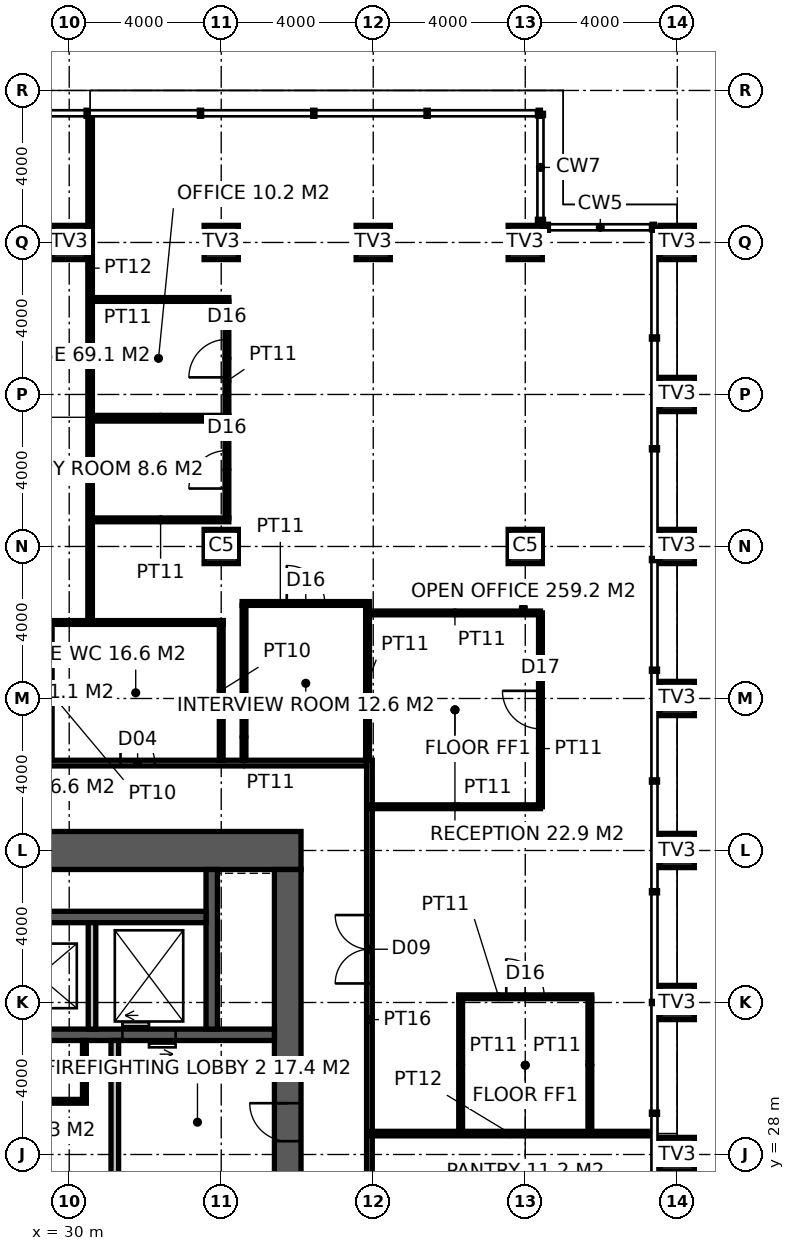
"""IFC4 building model, lengths in metres.
Left out: names, types, materials, properties, quantities, classifications, styles, units other than length and angle.
Written with IfcOpenShell. Run it as: python <this file> out.ifc"""

import sys

from ifc_helpers import new_model, si_unit, direction, frame, frame_2d, origin, origin_2d, place, context, subcontext, project, spatial, rectangle, hollow_rectangle, extrude, element, fill, save


model = new_model("IFC4")
c1 = context("Model", 3, precision=1e-05, world=origin(), true_north=direction((0.0, 1.0)))
c2 = subcontext(c1, "Body", "Model", "MODEL_VIEW")
j1 = project(units=[si_unit("LENGTHUNIT", "METRE"), si_unit("PLANEANGLEUNIT", "RADIAN")], contexts=[c1])
p1 = place(None, origin())
s1 = spatial("IfcSite", under=j1, at=p1, CompositionType="ELEMENT")
p2 = place(p1, origin())
s2 = spatial("IfcBuilding", under=s1, at=p2, CompositionType="ELEMENT")
p3 = place(p2, frame((0.0, 0.0, 171.8)))
s3 = spatial("IfcBuildingStorey", under=s2, at=p3, CompositionType="ELEMENT", Elevation=171.8)
for number, where, z_axis, x_axis in (
    (1, (46.0, 28.0, 0.0), (0.0, 0.0, 1.0), (1.0, 0.0, 0.0)),
    (2, (46.0, 32.0, 0.0), (0.0, 0.0, 1.0), (1.0, 0.0, 0.0)),
    (3, (46.0, 36.0, 0.0), (0.0, 0.0, 1.0), (1.0, 0.0, 0.0)),
    (4, (46.0, 40.0, 0.0), (0.0, 0.0, 1.0), (1.0, 0.0, 0.0)),
    (5, (46.0, 44.0, 0.0), (0.0, 0.0, 1.0), (1.0, 0.0, 0.0)),
    (6, (46.0, 48.0, 0.0), (0.0, 0.0, 1.0), (1.0, 0.0, 0.0)),
    (7, (46.0, 52.0, 0.0), (0.0, 0.0, 1.0), (1.0, 0.0, 0.0)),
    (8, (30.0, 52.0, 0.0), (0.0, 0.0, 1.0), (1.0, 0.0, 0.0)),
    (9, (34.0, 52.0, 0.0), (0.0, 0.0, 1.0), (1.0, 0.0, 0.0)),
    (10, (38.0, 52.0, 0.0), (0.0, 0.0, 1.0), (1.0, 0.0, 0.0)),
    (11, (42.0, 52.0, 0.0), (0.0, 0.0, 1.0), (1.0, 0.0, 0.0)),
):
    element("IfcColumn", number, at=place(p3, frame(where, z_axis=z_axis, x_axis=x_axis)), inside=s3, PredefinedType="USERDEFINED", context=c2, shape_type="SweptSolid", body=[
        extrude(hollow_rectangle(XDim=0.9, YDim=0.9, WallThickness=0.08, at=origin_2d()), origin(), (0.0, 0.0, 1.0), 4.0),
    ])
for number, where, z_axis, x_axis in (
    (12, (34.0, 44.0, 0.0), (0.0, 0.0, 1.0), (1.0, 0.0, 0.0)),
    (13, (42.0, 44.0, 0.0), (0.0, 0.0, 1.0), (1.0, 0.0, 0.0)),
):
    element("IfcColumn", number, at=place(p3, frame(where, z_axis=z_axis, x_axis=x_axis)), inside=s3, PredefinedType="COLUMN", context=c2, shape_type="SweptSolid", body=[
        extrude(hollow_rectangle(XDim=0.9, YDim=0.9, WallThickness=0.1, at=origin_2d()), origin(), (0.0, 0.0, 1.0), 4.0),
    ])
p4 = place(p3, frame((18.5, 36.0, -0.15), z_axis=(0.0, 0.0, 1.0), x_axis=(1.0, 0.0, 0.0)))
e14 = element("IfcWall", 14, at=p4, inside=s3, PredefinedType="SHEAR", context=c2, shape_type="SweptSolid", body=[
    extrude(rectangle(XDim=17.6, YDim=1.0, at=frame_2d((8.8, 0.0))), origin(), (0.0, 0.0, 1.0), 4.0),
])
p5 = place(p3, frame((35.75, 18.5, -0.15), z_axis=(0.0, 0.0, 1.0), x_axis=(0.0, 1.0, 0.0)))
e15 = element("IfcWall", 15, at=p5, inside=s3, PredefinedType="SHEAR", context=c2, shape_type="SweptSolid", body=[
    extrude(rectangle(XDim=17.0, YDim=0.7, at=frame_2d((8.5, 0.0))), origin(), (0.0, 0.0, 1.0), 4.0),
])
p6 = place(p5, frame((9.85, 0.0, 0.15)))
e16 = element("IfcOpeningElement", 16, at=p6, cuts=e15, PredefinedType="OPENING", context=c2, shape_type="SweptSolid", body=[
    extrude(rectangle(XDim=1.0, YDim=2.2, at=frame_2d((0.5, 1.1))), frame((0.0, 0.36, 0.0), z_axis=(0.0, -1.0, 0.0), x_axis=(1.0, 0.0, 0.0)), (0.0, 0.0, 1.0), 0.72),
])
p7 = place(p3, frame((24.15, 31.15, -0.15), z_axis=(0.0, 0.0, 1.0), x_axis=(1.0, 0.0, 0.0)))
e17 = element("IfcWall", 17, at=p7, inside=s3, PredefinedType="SHEAR", context=c2, shape_type="SweptSolid", body=[
    extrude(rectangle(XDim=11.25, YDim=0.3, at=frame_2d((5.625, 0.0))), origin(), (0.0, 0.0, 1.0), 4.0),
])
p8 = place(p7, frame((7.25, 0.0, 0.15)))
e18 = element("IfcOpeningElement", 18, at=p8, cuts=e17, PredefinedType="OPENING", context=c2, shape_type="SweptSolid", body=[
    extrude(rectangle(XDim=1.4, YDim=2.4, at=frame_2d((0.7, 1.2))), frame((0.0, 0.16, 0.0), z_axis=(0.0, -1.0, 0.0), x_axis=(1.0, 0.0, 0.0)), (0.0, 0.0, 1.0), 0.32),
])
p9 = place(p3, frame((33.75, 31.3, -0.15), z_axis=(0.0, 0.0, 1.0), x_axis=(0.0, 1.0, 0.0)))
e19 = element("IfcWall", 19, at=p9, inside=s3, PredefinedType="SHEAR", context=c2, shape_type="SweptSolid", body=[
    extrude(rectangle(XDim=4.2, YDim=0.3, at=frame_2d((2.1, 0.0))), origin(), (0.0, 0.0, 1.0), 4.0),
])
p10 = place(p3, frame((25.0, 34.25, -0.15), z_axis=(0.0, 0.0, 1.0), x_axis=(1.0, 0.0, 0.0)))
e20 = element("IfcWall", 20, at=p10, inside=s3, PredefinedType="SHEAR", context=c2, shape_type="SweptSolid", body=[
    extrude(rectangle(XDim=8.6, YDim=0.3, at=frame_2d((4.3, 0.0))), origin(), (0.0, 0.0, 1.0), 4.0),
])
p11 = place(p3, frame((30.6, 31.3, -0.15), z_axis=(0.0, 0.0, 1.0), x_axis=(0.0, 1.0, 0.0)))
e21 = element("IfcWall", 21, at=p11, inside=s3, PredefinedType="SOLIDWALL", context=c2, shape_type="SweptSolid", body=[
    extrude(rectangle(XDim=2.8, YDim=0.2, at=frame_2d((1.4, 0.0))), origin(), (0.0, 0.0, 1.0), 4.0),
])
p12 = place(p3, frame((31.2, 26.7, 0.0), z_axis=(0.0, 0.0, 1.0), x_axis=(0.0, 1.0, 0.0)))
e22 = element("IfcWall", 22, at=p12, inside=s3, PredefinedType="SOLIDWALL", context=c2, shape_type="SweptSolid", body=[
    extrude(rectangle(XDim=4.3, YDim=0.2, at=frame_2d((2.15, 0.0))), origin(), (0.0, 0.0, 1.0), 3.85),
])
p13 = place(p3, frame((25.75, 29.4, 0.0), z_axis=(0.0, 0.0, 1.0), x_axis=(1.0, 0.0, 0.0)))
e23 = element("IfcWall", 23, at=p13, inside=s3, PredefinedType="PARTITIONING", context=c2, shape_type="SweptSolid", body=[
    extrude(rectangle(XDim=4.7, YDim=0.1, at=frame_2d((2.35, 0.0))), origin(), (0.0, 0.0, 1.0), 3.85),
])
p14 = place(p13, frame((1.85, 0.0, 0.0)))
e24 = element("IfcOpeningElement", 24, at=p14, cuts=e23, PredefinedType="OPENING", context=c2, shape_type="SweptSolid", body=[
    extrude(rectangle(XDim=1.0, YDim=2.2, at=frame_2d((0.5, 1.1))), frame((0.0, 0.06, 0.0), z_axis=(0.0, -1.0, 0.0), x_axis=(1.0, 0.0, 0.0)), (0.0, 0.0, 1.0), 0.12),
])
p15 = place(p3, frame((30.4, 29.45, 0.0), z_axis=(0.0, 0.0, 1.0), x_axis=(0.0, 1.0, 0.0)))
e25 = element("IfcWall", 25, at=p15, inside=s3, PredefinedType="PARTITIONING", context=c2, shape_type="SweptSolid", body=[
    extrude(rectangle(XDim=1.55, YDim=0.1, at=frame_2d((0.775, 0.0))), origin(), (0.0, 0.0, 1.0), 3.85),
])
p16 = place(p3, frame((37.9, 15.625, 0.0), z_axis=(0.0, 0.0, 1.0), x_axis=(0.0, 1.0, 0.0)))
e26 = element("IfcWall", 26, at=p16, inside=s3, PredefinedType="PARTITIONING", context=c2, shape_type="SweptSolid", body=[
    extrude(rectangle(XDim=22.75, YDim=0.15, at=frame_2d((11.375, 0.0))), origin(), (0.0, 0.0, 1.0), 2.65),
])
p17 = place(p16, frame((3.074, 0.0, 0.0)))
e27 = element("IfcOpeningElement", 27, at=p17, cuts=e26, PredefinedType="OPENING", context=c2, shape_type="SweptSolid", body=[
    extrude(rectangle(XDim=1.8, YDim=2.4, at=frame_2d((0.9, 1.2))), frame((0.0, 0.085, 0.0), z_axis=(0.0, -1.0, 0.0), x_axis=(1.0, 0.0, 0.0)), (0.0, 0.0, 1.0), 0.17),
])
p18 = place(p16, frame((16.876, 0.0, 0.0)))
e28 = element("IfcOpeningElement", 28, at=p18, cuts=e26, PredefinedType="OPENING", context=c2, shape_type="SweptSolid", body=[
    extrude(rectangle(XDim=1.8, YDim=2.4, at=frame_2d((0.9, 1.2))), frame((0.0, 0.085, 0.0), z_axis=(0.0, -1.0, 0.0), x_axis=(1.0, 0.0, 0.0)), (0.0, 0.0, 1.0), 0.17),
])
p19 = place(p16, frame((9.875, 0.0, 0.0)))
e29 = element("IfcOpeningElement", 29, at=p19, cuts=e26, PredefinedType="OPENING", context=c2, shape_type="SweptSolid", body=[
    extrude(rectangle(XDim=1.0, YDim=2.2, at=frame_2d((0.5, 1.1))), frame((0.0, 0.085, 0.0), z_axis=(0.0, -1.0, 0.0), x_axis=(1.0, 0.0, 0.0)), (0.0, 0.0, 1.0), 0.17),
])
p20 = place(p3, frame((15.775, 38.3, 0.0), z_axis=(0.0, 0.0, 1.0), x_axis=(1.0, 0.0, 0.0)))
e30 = element("IfcWall", 30, at=p20, inside=s3, PredefinedType="PARTITIONING", context=c2, shape_type="SweptSolid", body=[
    extrude(rectangle(XDim=22.05, YDim=0.15, at=frame_2d((11.025, 0.0))), origin(), (0.0, 0.0, 1.0), 3.85),
])
p21 = place(p20, frame((7.975, 0.0, 0.0)))
e31 = element("IfcOpeningElement", 31, at=p21, cuts=e30, PredefinedType="OPENING", context=c2, shape_type="SweptSolid", body=[
    extrude(rectangle(XDim=0.9, YDim=2.1, at=frame_2d((0.45, 1.05))), frame((0.0, 0.085, 0.0), z_axis=(0.0, -1.0, 0.0), x_axis=(1.0, 0.0, 0.0)), (0.0, 0.0, 1.0), 0.17),
])
p22 = place(p20, frame((11.725, 0.0, 0.0)))
e32 = element("IfcOpeningElement", 32, at=p22, cuts=e30, PredefinedType="OPENING", context=c2, shape_type="SweptSolid", body=[
    extrude(rectangle(XDim=1.0, YDim=2.1, at=frame_2d((0.5, 1.05))), frame((0.0, 0.085, 0.0), z_axis=(0.0, -1.0, 0.0), x_axis=(1.0, 0.0, 0.0)), (0.0, 0.0, 1.0), 0.17),
])
p23 = place(p20, frame((15.575, 0.0, 0.0)))
e33 = element("IfcOpeningElement", 33, at=p23, cuts=e30, PredefinedType="OPENING", context=c2, shape_type="SweptSolid", body=[
    extrude(rectangle(XDim=0.9, YDim=2.1, at=frame_2d((0.45, 1.05))), frame((0.0, 0.085, 0.0), z_axis=(0.0, -1.0, 0.0), x_axis=(1.0, 0.0, 0.0)), (0.0, 0.0, 1.0), 0.17),
])
p24 = place(p3, frame((34.0, 38.375, 0.0), z_axis=(0.0, 0.0, 1.0), x_axis=(0.0, 1.0, 0.0)))
e34 = element("IfcWall", 34, at=p24, inside=s3, PredefinedType="PARTITIONING", context=c2, shape_type="SweptSolid", body=[
    extrude(rectangle(XDim=3.675, YDim=0.1, at=frame_2d((1.837, 0.0))), origin(), (0.0, 0.0, 1.0), 2.95),
])
p25 = place(p3, frame((21.95, 42.0, 0.0), z_axis=(0.0, 0.0, 1.0), x_axis=(1.0, 0.0, 0.0)))
e35 = element("IfcWall", 35, at=p25, inside=s3, PredefinedType="PARTITIONING", context=c2, shape_type="SweptSolid", body=[
    extrude(rectangle(XDim=12.1, YDim=0.1, at=frame_2d((6.05, 0.0))), origin(), (0.0, 0.0, 1.0), 3.85),
])
p26 = place(p3, frame((37.9, 28.55, 0.0), z_axis=(0.0, 0.0, 1.0), x_axis=(1.0, 0.0, 0.0)))
e36 = element("IfcWall", 36, at=p26, inside=s3, PredefinedType="PARTITIONING", context=c2, shape_type="SweptSolid", body=[
    extrude(rectangle(XDim=7.42, YDim=0.12, at=frame_2d((3.71, 0.0))), origin(), (0.0, 0.0, 1.0), 2.65),
])
p27 = place(p3, frame((30.55, 42.0, 0.0), z_axis=(0.0, 0.0, 1.0), x_axis=(0.0, 1.0, 0.0)))
e37 = element("IfcWall", 37, at=p27, inside=s3, PredefinedType="PARTITIONING", context=c2, shape_type="SweptSolid", body=[
    extrude(rectangle(XDim=13.32, YDim=0.12, at=frame_2d((6.66, 0.0))), origin(), (0.0, 0.0, 1.0), 3.85),
])
p28 = place(p3, frame((40.25, 32.15, 0.0), z_axis=(0.0, 0.0, 1.0), x_axis=(1.0, 0.0, 0.0)))
e38 = element("IfcWall", 38, at=p28, inside=s3, PredefinedType="PARTITIONING", context=c2, shape_type="SweptSolid", body=[
    extrude(rectangle(XDim=3.5, YDim=0.1, at=frame_2d((1.75, 0.0))), origin(), (0.0, 0.0, 1.0), 2.95),
])
p29 = place(p28, frame((1.25, 0.0, 0.0)))
e39 = element("IfcOpeningElement", 39, at=p29, cuts=e38, PredefinedType="OPENING", context=c2, shape_type="SweptSolid", body=[
    extrude(rectangle(XDim=1.0, YDim=2.2, at=frame_2d((0.5, 1.1))), frame((0.0, 0.06, 0.0), z_axis=(0.0, -1.0, 0.0), x_axis=(1.0, 0.0, 0.0)), (0.0, 0.0, 1.0), 0.12),
])
p30 = place(p3, frame((34.55, 42.5, 0.0), z_axis=(0.0, 0.0, 1.0), x_axis=(1.0, 0.0, 0.0)))
e40 = element("IfcWall", 40, at=p30, inside=s3, PredefinedType="PARTITIONING", context=c2, shape_type="SweptSolid", body=[
    extrude(rectangle(XDim=3.35, YDim=0.1, at=frame_2d((1.675, 0.0))), origin(), (0.0, 0.0, 1.0), 3.85),
])
p31 = place(p30, frame((1.175, 0.0, 0.0)))
e41 = element("IfcOpeningElement", 41, at=p31, cuts=e40, PredefinedType="OPENING", context=c2, shape_type="SweptSolid", body=[
    extrude(rectangle(XDim=1.0, YDim=2.2, at=frame_2d((0.5, 1.1))), frame((0.0, 0.06, 0.0), z_axis=(0.0, -1.0, 0.0), x_axis=(1.0, 0.0, 0.0)), (0.0, 0.0, 1.0), 0.12),
])
for number, where, z_axis, x_axis in (
    (42, (30.61, 44.7, 0.0), (0.0, 0.0, 1.0), (1.0, 0.0, 0.0)),
    (43, (30.61, 47.35, 0.0), (0.0, 0.0, 1.0), (1.0, 0.0, 0.0)),
    (44, (30.61, 47.4, 0.0), (0.0, 0.0, 1.0), (1.0, 0.0, 0.0)),
    (45, (30.61, 50.5, 0.0), (0.0, 0.0, 1.0), (1.0, 0.0, 0.0)),
):
    element("IfcWall", number, at=place(p3, frame(where, z_axis=z_axis, x_axis=x_axis)), inside=s3, PredefinedType="PARTITIONING", context=c2, shape_type="SweptSolid", body=[
        extrude(rectangle(XDim=3.59, YDim=0.1, at=frame_2d((1.795, 0.0))), origin(), (0.0, 0.0, 1.0), 3.85),
    ])
p32 = place(p3, frame((34.15, 44.75, 0.0), z_axis=(0.0, 0.0, 1.0), x_axis=(0.0, 1.0, 0.0)))
e46 = element("IfcWall", 46, at=p32, inside=s3, PredefinedType="PARTITIONING", context=c2, shape_type="SweptSolid", body=[
    extrude(rectangle(XDim=2.55, YDim=0.1, at=frame_2d((1.275, 0.0))), origin(), (0.0, 0.0, 1.0), 2.95),
])
p33 = place(p32, frame((0.775, 0.0, 0.0)))
e47 = element("IfcOpeningElement", 47, at=p33, cuts=e46, PredefinedType="OPENING", context=c2, shape_type="SweptSolid", body=[
    extrude(rectangle(XDim=1.0, YDim=2.2, at=frame_2d((0.5, 1.1))), frame((0.0, 0.06, 0.0), z_axis=(0.0, -1.0, 0.0), x_axis=(1.0, 0.0, 0.0)), (0.0, 0.0, 1.0), 0.12),
])
p34 = place(p3, frame((34.15, 47.45, 0.0), z_axis=(0.0, 0.0, 1.0), x_axis=(0.0, 1.0, 0.0)))
e48 = element("IfcWall", 48, at=p34, inside=s3, PredefinedType="PARTITIONING", context=c2, shape_type="SweptSolid", body=[
    extrude(rectangle(XDim=3.0, YDim=0.1, at=frame_2d((1.5, 0.0))), origin(), (0.0, 0.0, 1.0), 2.95),
])
p35 = place(p34, frame((1.0, 0.0, 0.0)))
e49 = element("IfcOpeningElement", 49, at=p35, cuts=e48, PredefinedType="OPENING", context=c2, shape_type="SweptSolid", body=[
    extrude(rectangle(XDim=1.0, YDim=2.2, at=frame_2d((0.5, 1.1))), frame((0.0, 0.06, 0.0), z_axis=(0.0, -1.0, 0.0), x_axis=(1.0, 0.0, 0.0)), (0.0, 0.0, 1.0), 0.12),
])
p36 = place(p3, frame((34.6, 38.375, 0.0), z_axis=(0.0, 0.0, 1.0), x_axis=(0.0, 1.0, 0.0)))
e50 = element("IfcWall", 50, at=p36, inside=s3, PredefinedType="PARTITIONING", context=c2, shape_type="SweptSolid", body=[
    extrude(rectangle(XDim=4.075, YDim=0.1, at=frame_2d((2.038, 0.0))), origin(), (0.0, 0.0, 1.0), 3.85),
])
p37 = place(p3, frame((37.85, 38.375, 0.0), z_axis=(0.0, 0.0, 1.0), x_axis=(0.0, 1.0, 0.0)))
e51 = element("IfcWall", 51, at=p37, inside=s3, PredefinedType="PARTITIONING", context=c2, shape_type="SweptSolid", body=[
    extrude(rectangle(XDim=4.075, YDim=0.1, at=frame_2d((2.038, 0.0))), origin(), (0.0, 0.0, 1.0), 2.65),
])
for number, where, z_axis, x_axis in (
    (52, (40.3, 28.61, 0.0), (0.0, 0.0, 1.0), (0.0, 1.0, 0.0)),
    (53, (43.7, 28.61, 0.0), (0.0, 0.0, 1.0), (0.0, 1.0, 0.0)),
):
    element("IfcWall", number, at=place(p3, frame(where, z_axis=z_axis, x_axis=x_axis)), inside=s3, PredefinedType="PARTITIONING", context=c2, shape_type="SweptSolid", body=[
        extrude(rectangle(XDim=3.49, YDim=0.1, at=frame_2d((1.745, 0.0))), origin(), (0.0, 0.0, 1.0), 3.85),
    ])
p38 = place(p3, frame((37.9, 37.151, 0.0), z_axis=(0.0, 0.0, 1.0), x_axis=(1.0, 0.0, 0.0)))
e54 = element("IfcWall", 54, at=p38, inside=s3, PredefinedType="PARTITIONING", context=c2, shape_type="SweptSolid", body=[
    extrude(rectangle(XDim=4.5, YDim=0.1, at=frame_2d((2.25, 0.0))), origin(), (0.0, 0.0, 1.0), 3.85),
])
p39 = place(p3, frame((42.4, 37.151, 0.0), z_axis=(0.0, 0.0, 1.0), x_axis=(0.0, 1.0, 0.0)))
e55 = element("IfcWall", 55, at=p39, inside=s3, PredefinedType="PARTITIONING", context=c2, shape_type="SweptSolid", body=[
    extrude(rectangle(XDim=5.1, YDim=0.1, at=frame_2d((2.55, 0.0))), origin(), (0.0, 0.0, 1.0), 2.65),
])
p40 = place(p39, frame((2.05, 0.0, 0.0)))
e56 = element("IfcOpeningElement", 56, at=p40, cuts=e55, PredefinedType="OPENING", context=c2, shape_type="SweptSolid", body=[
    extrude(rectangle(XDim=1.0, YDim=2.2, at=frame_2d((0.5, 1.1))), frame((0.0, 0.06, 0.0), z_axis=(0.0, -1.0, 0.0), x_axis=(1.0, 0.0, 0.0)), (0.0, 0.0, 1.0), 0.12),
])
p41 = place(p3, frame((42.4, 42.251, 0.0), z_axis=(0.0, 0.0, 1.0), x_axis=(-1.0, 0.0, 0.0)))
e57 = element("IfcWall", 57, at=p41, inside=s3, PredefinedType="PARTITIONING", context=c2, shape_type="SweptSolid", body=[
    extrude(rectangle(XDim=4.5, YDim=0.1, at=frame_2d((2.25, 0.0))), origin(), (0.0, 0.0, 1.0), 3.85),
])
p42 = place(p6, origin())
e58 = element("IfcDoor", 58, at=p42, inside=s3, OperationType="SINGLE_SWING_RIGHT", PredefinedType="DOOR", context=c2, shape_type="SweptSolid", body=[
    extrude(rectangle(XDim=1.0, YDim=2.2, at=frame_2d((0.5, 1.1))), frame((0.0, 0.025, 0.0), z_axis=(0.0, -1.0, 0.0), x_axis=(1.0, 0.0, 0.0)), (0.0, 0.0, 1.0), 0.05),
])
fill(e16, e58)
p43 = place(p23, origin())
e59 = element("IfcDoor", 59, at=p43, inside=s3, OperationType="SINGLE_SWING_LEFT", PredefinedType="DOOR", context=c2, shape_type="SweptSolid", body=[
    extrude(rectangle(XDim=0.9, YDim=2.1, at=frame_2d((0.45, 1.05))), frame((0.0, 0.025, 0.0), z_axis=(0.0, -1.0, 0.0), x_axis=(1.0, 0.0, 0.0)), (0.0, 0.0, 1.0), 0.05),
])
fill(e33, e59)
p44 = place(p18, origin())
e60 = element("IfcDoor", 60, at=p44, inside=s3, OperationType="DOUBLE_DOOR_DOUBLE_SWING", PredefinedType="DOOR", context=c2, shape_type="SweptSolid", body=[
    extrude(rectangle(XDim=1.8, YDim=2.4, at=frame_2d((0.9, 1.2))), frame((0.0, 0.025, 0.0), z_axis=(0.0, -1.0, 0.0), x_axis=(1.0, 0.0, 0.0)), (0.0, 0.0, 1.0), 0.05),
])
fill(e28, e60)
p45 = place(p31, origin())
e61 = element("IfcDoor", 61, at=p45, inside=s3, OperationType="SINGLE_SWING_LEFT", PredefinedType="DOOR", context=c2, shape_type="SweptSolid", body=[
    extrude(rectangle(XDim=1.0, YDim=2.2, at=frame_2d((0.5, 1.1))), frame((0.0, 0.025, 0.0), z_axis=(0.0, -1.0, 0.0), x_axis=(1.0, 0.0, 0.0)), (0.0, 0.0, 1.0), 0.05),
])
fill(e41, e61)
p46 = place(p29, origin())
e62 = element("IfcDoor", 62, at=p46, inside=s3, OperationType="SINGLE_SWING_LEFT", PredefinedType="DOOR", context=c2, shape_type="SweptSolid", body=[
    extrude(rectangle(XDim=1.0, YDim=2.2, at=frame_2d((0.5, 1.1))), frame((0.0, 0.025, 0.0), z_axis=(0.0, -1.0, 0.0), x_axis=(1.0, 0.0, 0.0)), (0.0, 0.0, 1.0), 0.05),
])
fill(e39, e62)
p47 = place(p33, origin())
e63 = element("IfcDoor", 63, at=p47, inside=s3, OperationType="SINGLE_SWING_LEFT", PredefinedType="DOOR", context=c2, shape_type="SweptSolid", body=[
    extrude(rectangle(XDim=1.0, YDim=2.2, at=frame_2d((0.5, 1.1))), frame((0.0, 0.025, 0.0), z_axis=(0.0, -1.0, 0.0), x_axis=(1.0, 0.0, 0.0)), (0.0, 0.0, 1.0), 0.05),
])
fill(e47, e63)
p48 = place(p35, origin())
e64 = element("IfcDoor", 64, at=p48, inside=s3, OperationType="SINGLE_SWING_LEFT", PredefinedType="DOOR", context=c2, shape_type="SweptSolid", body=[
    extrude(rectangle(XDim=1.0, YDim=2.2, at=frame_2d((0.5, 1.1))), frame((0.0, 0.025, 0.0), z_axis=(0.0, -1.0, 0.0), x_axis=(1.0, 0.0, 0.0)), (0.0, 0.0, 1.0), 0.05),
])
fill(e49, e64)
p49 = place(p40, origin())
e65 = element("IfcDoor", 65, at=p49, inside=s3, OperationType="SINGLE_SWING_RIGHT", PredefinedType="DOOR", context=c2, shape_type="SweptSolid", body=[
    extrude(rectangle(XDim=1.0, YDim=2.2, at=frame_2d((0.5, 1.1))), frame((0.0, 0.025, 0.0), z_axis=(0.0, -1.0, 0.0), x_axis=(1.0, 0.0, 0.0)), (0.0, 0.0, 1.0), 0.05),
])
fill(e56, e65)
p50 = place(p8, origin())
e66 = element("IfcDoor", 66, at=p50, inside=s3, OperationType="DOUBLE_DOOR_SLIDING", PredefinedType="DOOR", context=c2, shape_type="SweptSolid", body=[
    extrude(rectangle(XDim=1.4, YDim=2.4, at=frame_2d((0.7, 1.2))), frame((0.0, 0.025, 0.0), z_axis=(0.0, -1.0, 0.0), x_axis=(1.0, 0.0, 0.0)), (0.0, 0.0, 1.0), 0.05),
])
fill(e18, e66)
save(model, sys.argv[1])
